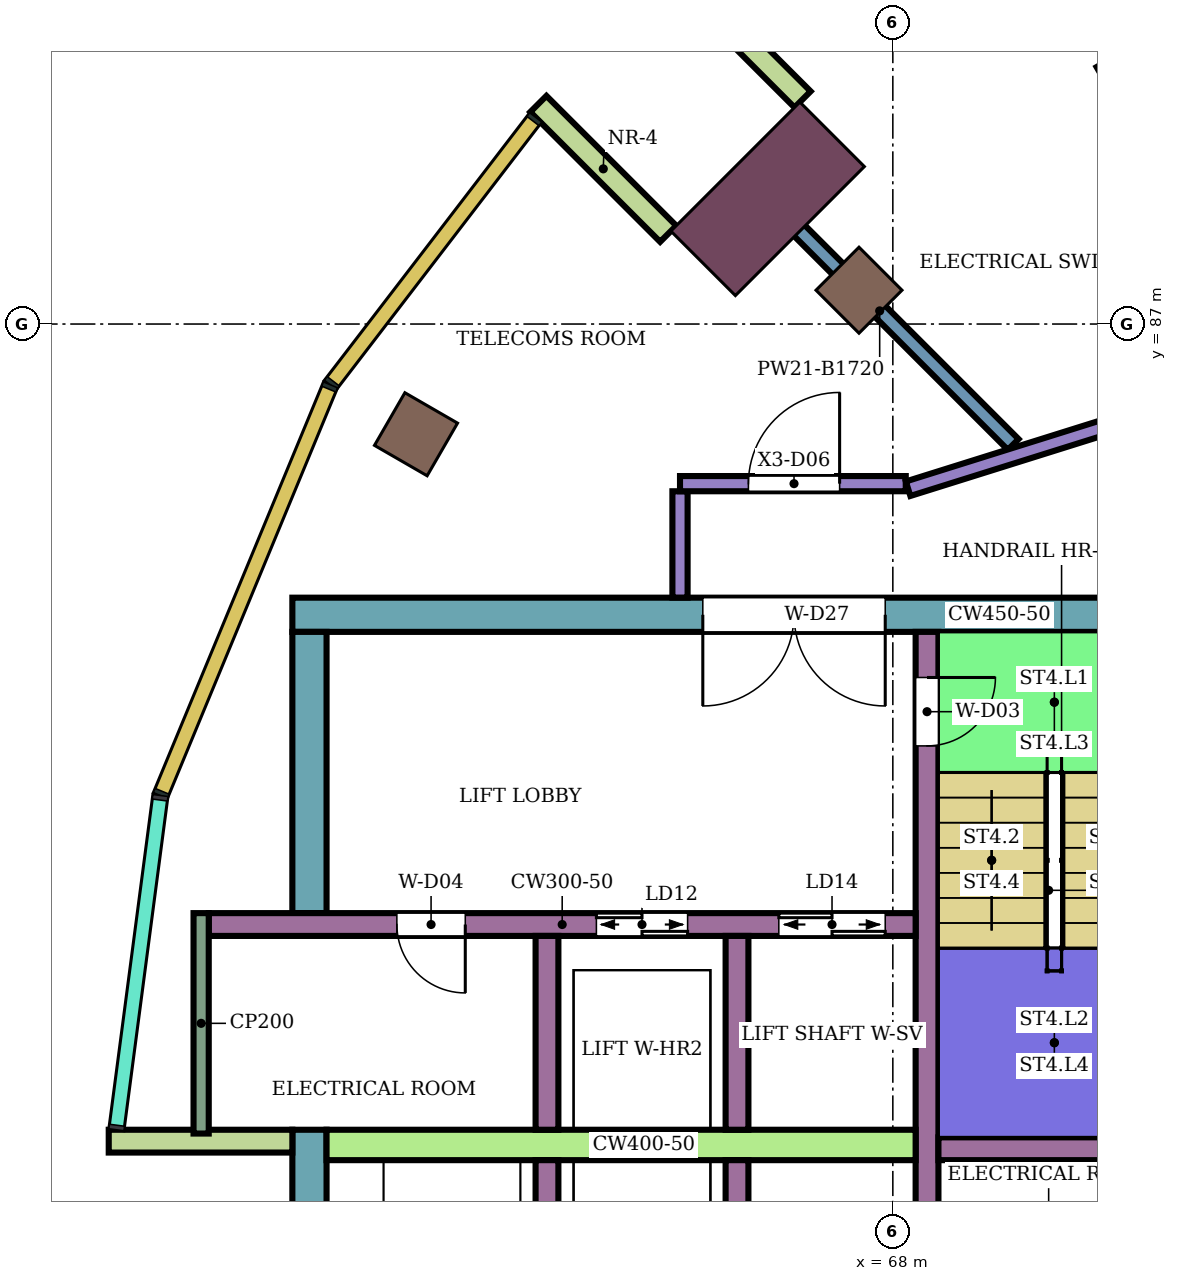
"""IFC4 building model, lengths in metres.
Left out: names, types, materials, properties, quantities, classifications, styles, units other than length and angle.
Written with IfcOpenShell. Run it as: python <this file> out.ifc"""

import sys

from ifc_helpers import new_model, si_unit, direction, frame, frame_2d, origin, origin_2d, place, context, subcontext, project, spatial, rectangle, extrude, element, fill, save


model = new_model("IFC4")
c1 = context("Model", 3, precision=1e-05, world=origin(), true_north=direction((0.0, 1.0)))
c2 = subcontext(c1, "Body", "Model", "MODEL_VIEW")
j1 = project(units=[si_unit("LENGTHUNIT", "METRE"), si_unit("PLANEANGLEUNIT", "RADIAN")], contexts=[c1])
p1 = place(None, origin())
s1 = spatial("IfcSite", under=j1, at=p1, CompositionType="ELEMENT")
p2 = place(p1, origin())
s2 = spatial("IfcBuilding", under=s1, at=p2, CompositionType="ELEMENT")
p3 = place(p2, frame((0.0, 0.0, 309.3)))
s3 = spatial("IfcBuildingStorey", under=s2, at=p3, CompositionType="ELEMENT", Elevation=309.3)
for number, where, z_axis, x_axis in (
    (1, (61.727, 85.55, 0.0), (0.0, 0.0, 1.0), (-0.866, 0.5, 0.0)),
    (2, (71.2, 90.242, 0.0), (0.0, 0.0, 1.0), (-0.5, 0.866, 0.0)),
    (3, (67.555, 87.445, 0.0), (0.0, 0.0, 1.0), (-0.707, 0.707, 0.0)),
):
    element("IfcColumn", number, at=place(p3, frame(where, z_axis=z_axis, x_axis=x_axis)), inside=s3, PredefinedType="COLUMN", context=c2, shape_type="SweptSolid", body=[
        extrude(rectangle(XDim=0.8, YDim=0.8, at=origin_2d()), origin(), (0.0, 0.0, 1.0), 5.6),
    ])
p4 = place(p3, frame((66.353, 88.647, 0.0), z_axis=(0.0, 0.0, 1.0), x_axis=(-0.707106781187, 0.707106781187, 0.0)))
e4 = element("IfcColumn", 4, at=p4, inside=s3, PredefinedType="COLUMN", context=c2, shape_type="SweptSolid", body=[
    extrude(rectangle(XDim=1.2, YDim=2.4, at=origin_2d()), origin(), (0.0, 0.0, 1.0), 5.6),
])
p5 = place(p3, frame((72.1, 83.175, 0.0), z_axis=(0.0, 0.0, 1.0), x_axis=(-1.0, 0.0, 0.0)))
e5 = element("IfcWall", 5, at=p5, inside=s3, PredefinedType="SHEAR", context=c2, shape_type="SweptSolid", body=[
    extrude(rectangle(XDim=12.0, YDim=0.45, at=frame_2d((6.0, 0.0))), origin(), (0.0, 0.0, 1.0), 5.28),
])
p6 = place(p5, frame((4.2, 0.0, 0.0)))
e6 = element("IfcOpeningElement", 6, at=p6, cuts=e5, PredefinedType="OPENING", context=c2, shape_type="SweptSolid", body=[
    extrude(rectangle(XDim=2.4, YDim=2.4, at=frame_2d((1.2, 1.2))), frame((0.0, 0.235, 0.0), z_axis=(0.0, -1.0, 0.0), x_axis=(1.0, 0.0, 0.0)), (0.0, 0.0, 1.0), 0.47),
])
p7 = place(p3, frame((60.325, 76.4, 0.0), z_axis=(0.0, 0.0, 1.0), x_axis=(0.0, -1.0, 0.0)))
e7 = element("IfcWall", 7, at=p7, inside=s3, PredefinedType="SHEAR", context=c2, shape_type="SweptSolid", body=[
    extrude(rectangle(XDim=9.35, YDim=0.45, at=frame_2d((4.675, 0.0))), origin(), (0.0, 0.0, 1.0), 5.28),
])
p8 = place(p3, frame((60.325, 82.95, 0.0), z_axis=(0.0, 0.0, 1.0), x_axis=(0.0, -1.0, 0.0)))
e8 = element("IfcWall", 8, at=p8, inside=s3, PredefinedType="SHEAR", context=c2, shape_type="SweptSolid", body=[
    extrude(rectangle(XDim=3.7, YDim=0.45, at=frame_2d((1.85, 0.0))), origin(), (0.0, 0.0, 1.0), 5.28),
])
p9 = place(p3, frame((68.45, 82.95, 0.0), z_axis=(0.0, 0.0, 1.0), x_axis=(0.0, -1.0, 0.0)))
e9 = element("IfcWall", 9, at=p9, inside=s3, PredefinedType="SHEAR", context=c2, shape_type="SweptSolid", body=[
    extrude(rectangle(XDim=7.95, YDim=0.3, at=frame_2d((3.975, 0.0))), origin(), (0.0, 0.0, 1.0), 5.28),
])
p10 = place(p9, frame((0.6, 0.0, 0.0)))
e10 = element("IfcOpeningElement", 10, at=p10, cuts=e9, PredefinedType="OPENING", context=c2, shape_type="SweptSolid", body=[
    extrude(rectangle(XDim=0.9, YDim=2.1, at=frame_2d((0.45, 1.05))), frame((0.0, 0.16, 0.0), z_axis=(0.0, -1.0, 0.0), x_axis=(1.0, 0.0, 0.0)), (0.0, 0.0, 1.0), 0.32),
])
p11 = place(p3, frame((71.65, 76.15, 0.0), z_axis=(0.0, 0.0, 1.0), x_axis=(-1.0, 0.0, 0.0)))
e11 = element("IfcWall", 11, at=p11, inside=s3, PredefinedType="SHEAR", context=c2, shape_type="SweptSolid", body=[
    extrude(rectangle(XDim=3.05, YDim=0.3, at=frame_2d((1.525, 0.0))), origin(), (0.0, 0.0, 1.0), 5.28),
])
p12 = place(p3, frame((68.3, 76.2, 0.0), z_axis=(0.0, 0.0, 1.0), x_axis=(-1.0, 0.0, 0.0)))
e12 = element("IfcWall", 12, at=p12, inside=s3, PredefinedType="SHEAR", context=c2, shape_type="SweptSolid", body=[
    extrude(rectangle(XDim=7.75, YDim=0.4, at=frame_2d((3.875, 0.0))), origin(), (0.0, 0.0, 1.0), 5.28),
])
p13 = place(p3, frame((68.3, 79.1, 0.0), z_axis=(0.0, 0.0, 1.0), x_axis=(-1.0, 0.0, 0.0)))
e13 = element("IfcWall", 13, at=p13, inside=s3, PredefinedType="SHEAR", context=c2, shape_type="SweptSolid", body=[
    extrude(rectangle(XDim=9.3, YDim=0.3, at=frame_2d((4.65, 0.0))), origin(), (0.0, 0.0, 1.0), 5.28),
])
p14 = place(p13, frame((0.4, 0.0, 0.0)))
e14 = element("IfcOpeningElement", 14, at=p14, cuts=e13, PredefinedType="OPENING", context=c2, shape_type="SweptSolid", body=[
    extrude(rectangle(XDim=1.4, YDim=2.1, at=frame_2d((0.7, 1.05))), frame((0.0, 0.16, 0.0), z_axis=(0.0, -1.0, 0.0), x_axis=(1.0, 0.0, 0.0)), (0.0, 0.0, 1.0), 0.32),
])
p15 = place(p13, frame((3.0, 0.0, 0.0)))
e15 = element("IfcOpeningElement", 15, at=p15, cuts=e13, PredefinedType="OPENING", context=c2, shape_type="SweptSolid", body=[
    extrude(rectangle(XDim=1.2, YDim=2.1, at=frame_2d((0.6, 1.05))), frame((0.0, 0.16, 0.0), z_axis=(0.0, -1.0, 0.0), x_axis=(1.0, 0.0, 0.0)), (0.0, 0.0, 1.0), 0.32),
])
p16 = place(p13, frame((5.925, 0.0, 0.0)))
e16 = element("IfcOpeningElement", 16, at=p16, cuts=e13, PredefinedType="OPENING", context=c2, shape_type="SweptSolid", body=[
    extrude(rectangle(XDim=0.9, YDim=2.1, at=frame_2d((0.45, 1.05))), frame((0.0, 0.16, 0.0), z_axis=(0.0, -1.0, 0.0), x_axis=(1.0, 0.0, 0.0)), (0.0, 0.0, 1.0), 0.32),
])
for number, where, z_axis, x_axis in (
    (17, (65.95, 76.0, 0.0), (0.0, 0.0, 1.0), (0.0, -1.0, 0.0)),
    (18, (63.45, 76.0, 0.0), (0.0, 0.0, 1.0), (0.0, -1.0, 0.0)),
    (19, (65.95, 78.95, 0.0), (0.0, 0.0, 1.0), (0.0, -1.0, 0.0)),
    (20, (63.45, 78.95, 0.0), (0.0, 0.0, 1.0), (0.0, -1.0, 0.0)),
):
    element("IfcWall", number, at=place(p3, frame(where, z_axis=z_axis, x_axis=x_axis)), inside=s3, PredefinedType="SHEAR", context=c2, shape_type="SweptSolid", body=[
        extrude(rectangle(XDim=2.55, YDim=0.3, at=frame_2d((1.275, 0.0))), origin(), (0.0, 0.0, 1.0), 5.28),
    ])
for number, where, z_axis, x_axis in (
    (21, (66.812, 89.955, 0.0), (0.0, 0.0, 1.0), (-0.707, 0.707, 0.0)),
    (22, (65.045, 88.188, 0.0), (0.0, 0.0, 1.0), (-0.707, 0.707, 0.0)),
    (23, (60.1, 76.25, 0.0), (0.0, 0.0, 1.0), (-1.0, 0.0, 0.0)),
):
    element("IfcWall", number, at=place(p3, frame(where, z_axis=z_axis, x_axis=x_axis)), inside=s3, PredefinedType="NOTDEFINED", context=c2, shape_type="SweptSolid", body=[
        extrude(rectangle(XDim=2.416, YDim=0.3, at=frame_2d((1.208, 0.0))), origin(), (0.0, 0.0, 1.0), 5.6),
    ])
p17 = place(p3, frame((65.2, 83.401, 0.0), z_axis=(0.0, 0.0, 1.0), x_axis=(0.0, 1.0, 0.0)))
e24 = element("IfcWall", 24, at=p17, inside=s3, PredefinedType="PARTITIONING", context=c2, shape_type="SweptSolid", body=[
    extrude(rectangle(XDim=1.399, YDim=0.2, at=frame_2d((0.7, 0.0))), origin(), (0.0, 0.0, 1.0), 5.15),
])
p18 = place(p3, frame((65.2, 84.9, 0.0), z_axis=(0.0, 0.0, 1.0), x_axis=(1.0, 0.0, 0.0)))
e25 = element("IfcWall", 25, at=p18, inside=s3, PredefinedType="PARTITIONING", context=c2, shape_type="SweptSolid", body=[
    extrude(rectangle(XDim=2.97, YDim=0.2, at=frame_2d((1.485, 0.0))), origin(), (0.0, 0.0, 1.0), 5.15),
])
p19 = place(p18, frame((0.9, 0.0, 0.0)))
e26 = element("IfcOpeningElement", 26, at=p19, cuts=e25, PredefinedType="OPENING", context=c2, shape_type="SweptSolid", body=[
    extrude(rectangle(XDim=1.2, YDim=2.4, at=frame_2d((0.6, 1.2))), frame((0.0, 0.11, 0.0), z_axis=(0.0, -1.0, 0.0), x_axis=(1.0, 0.0, 0.0)), (0.0, 0.0, 1.0), 0.22),
])
p20 = place(p3, frame((66.07, 88.93, 0.0), z_axis=(0.0, 0.0, 1.0), x_axis=(0.707008510494, -0.707205038224, 0.0)))
e27 = element("IfcWall", 27, at=p20, inside=s3, PredefinedType="PARTITIONING", context=c2, shape_type="SweptSolid", body=[
    extrude(rectangle(XDim=4.969, YDim=0.2, at=frame_2d((2.484, 0.0))), origin(), (0.0, 0.0, 1.0), 3.88),
])
p21 = place(p3, frame((68.201, 84.833, 0.0), z_axis=(0.0, 0.0, 1.0), x_axis=(0.95420102455, 0.299166182492, 0.0)))
e28 = element("IfcWall", 28, at=p21, inside=s3, PredefinedType="PARTITIONING", context=c2, shape_type="SweptSolid", body=[
    extrude(rectangle(XDim=5.74, YDim=0.2, at=frame_2d((2.87, 0.0))), origin(), (0.0, 0.0, 1.0), 5.15),
])
p22 = place(p21, frame((2.899, 0.0, 0.0)))
e29 = element("IfcOpeningElement", 29, at=p22, cuts=e28, PredefinedType="OPENING", context=c2, shape_type="SweptSolid", body=[
    extrude(rectangle(XDim=1.2, YDim=2.4, at=frame_2d((0.6, 1.2))), frame((0.0, 0.11, 0.0), z_axis=(0.0, -1.0, 0.0), x_axis=(1.0, 0.0, 0.0)), (0.0, 0.0, 1.0), 0.22),
])
p23 = place(p3, frame((68.852, 94.311, 0.0), z_axis=(0.0, 0.0, 1.0), x_axis=(0.499940606313, -0.86605969203, 0.0)))
e30 = element("IfcWall", 30, at=p23, inside=s3, PredefinedType="PARTITIONING", context=c2, shape_type="SweptSolid", body=[
    extrude(rectangle(XDim=8.945, YDim=0.2, at=frame_2d((4.472, 0.0))), origin(), (0.0, 0.0, 1.0), 4.812),
])
p24 = place(p3, frame((58.9, 79.25, 0.0), z_axis=(0.0, 0.0, 1.0), x_axis=(0.0, -1.0, 0.0)))
e31 = element("IfcWall", 31, at=p24, inside=s3, PredefinedType="PARTITIONING", context=c2, shape_type="SweptSolid", body=[
    extrude(rectangle(XDim=2.9, YDim=0.2, at=frame_2d((1.45, 0.0))), origin(), (0.0, 0.0, 1.0), 5.28),
])
p25 = place(p19, origin())
e32 = element("IfcDoor", 32, at=p25, inside=s3, OperationType="SINGLE_SWING_RIGHT", PredefinedType="DOOR", context=c2, shape_type="SweptSolid", body=[
    extrude(rectangle(XDim=1.2, YDim=2.4, at=frame_2d((0.6, 1.2))), frame((0.0, 0.025, 0.0), z_axis=(0.0, -1.0, 0.0), x_axis=(1.0, 0.0, 0.0)), (0.0, 0.0, 1.0), 0.05),
])
fill(e26, e32)
p26 = place(p10, origin())
e33 = element("IfcDoor", 33, at=p26, inside=s3, OperationType="SINGLE_SWING_LEFT", PredefinedType="DOOR", context=c2, shape_type="SweptSolid", body=[
    extrude(rectangle(XDim=0.9, YDim=2.1, at=frame_2d((0.45, 1.05))), frame((0.0, 0.025, 0.0), z_axis=(0.0, -1.0, 0.0), x_axis=(1.0, 0.0, 0.0)), (0.0, 0.0, 1.0), 0.05),
])
fill(e10, e33)
p27 = place(p14, origin())
e34 = element("IfcDoor", 34, at=p27, inside=s3, OperationType="DOUBLE_DOOR_SLIDING", PredefinedType="DOOR", context=c2, shape_type="SweptSolid", body=[
    extrude(rectangle(XDim=1.4, YDim=2.1, at=frame_2d((0.7, 1.05))), frame((0.0, 0.025, 0.0), z_axis=(0.0, -1.0, 0.0), x_axis=(1.0, 0.0, 0.0)), (0.0, 0.0, 1.0), 0.05),
])
fill(e14, e34)
p28 = place(p15, origin())
e35 = element("IfcDoor", 35, at=p28, inside=s3, OperationType="DOUBLE_DOOR_SLIDING", PredefinedType="DOOR", context=c2, shape_type="SweptSolid", body=[
    extrude(rectangle(XDim=1.2, YDim=2.1, at=frame_2d((0.6, 1.05))), frame((0.0, 0.025, 0.0), z_axis=(0.0, -1.0, 0.0), x_axis=(1.0, 0.0, 0.0)), (0.0, 0.0, 1.0), 0.05),
])
fill(e15, e35)
p29 = place(p16, origin())
e36 = element("IfcDoor", 36, at=p29, inside=s3, OperationType="SINGLE_SWING_LEFT", PredefinedType="DOOR", context=c2, shape_type="SweptSolid", body=[
    extrude(rectangle(XDim=0.9, YDim=2.1, at=frame_2d((0.45, 1.05))), frame((0.0, 0.025, 0.0), z_axis=(0.0, -1.0, 0.0), x_axis=(1.0, 0.0, 0.0)), (0.0, 0.0, 1.0), 0.05),
])
fill(e16, e36)
p30 = place(p6, origin())
e37 = element("IfcDoor", 37, at=p30, inside=s3, OperationType="DOUBLE_DOOR_SINGLE_SWING", PredefinedType="DOOR", context=c2, shape_type="SweptSolid", body=[
    extrude(rectangle(XDim=2.4, YDim=2.4, at=frame_2d((1.2, 1.2))), frame((0.0, 0.025, 0.0), z_axis=(0.0, -1.0, 0.0), x_axis=(1.0, 0.0, 0.0)), (0.0, 0.0, 1.0), 0.05),
])
fill(e6, e37)
save(model, sys.argv[1])
